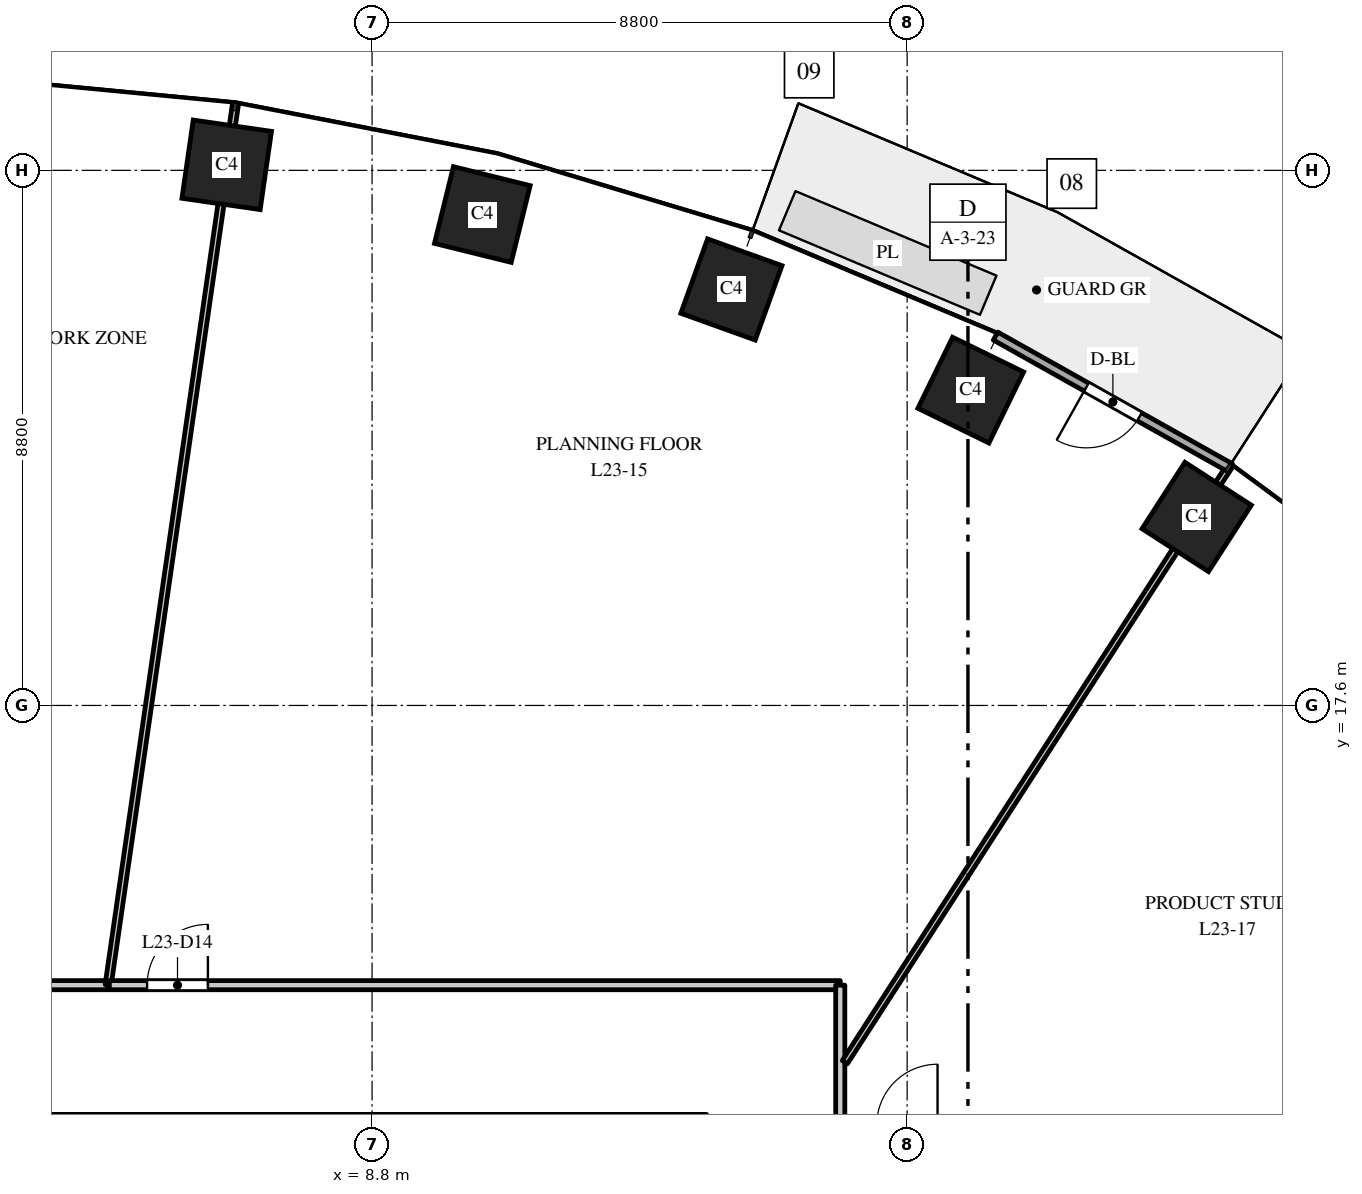
"""IFC4 building model, lengths in metres.
Left out: names, types, materials, properties, quantities, classifications, styles, units other than length and angle.
Written with IfcOpenShell. Run it as: python <this file> out.ifc"""

import sys

from ifc_helpers import new_model, si_unit, direction, frame, frame_2d, origin, origin_2d, place, context, subcontext, project, spatial, rectangle, extrude, element, fill, save


model = new_model("IFC4")
c1 = context("Model", 3, precision=1e-05, world=origin(), true_north=direction((0.0, 1.0)))
c2 = subcontext(c1, "Body", "Model", "MODEL_VIEW")
j1 = project(units=[si_unit("LENGTHUNIT", "METRE"), si_unit("PLANEANGLEUNIT", "RADIAN")], contexts=[c1])
p1 = place(None, origin())
s1 = spatial("IfcSite", under=j1, at=p1, CompositionType="ELEMENT")
p2 = place(p1, origin())
s2 = spatial("IfcBuilding", under=s1, at=p2, CompositionType="ELEMENT")
p3 = place(p2, frame((0.0, 0.0, 104.0)))
s3 = spatial("IfcBuildingStorey", under=s2, at=p3, CompositionType="ELEMENT", Elevation=104.0)
for number, where, z_axis, x_axis in (
    (1, (22.362, 20.7, 0.0), (0.0, 0.0, 1.0), (-0.84, 0.542, 0.0)),
    (2, (18.646, 22.785, 0.0), (0.0, 0.0, 1.0), (-0.898, 0.439, 0.0)),
    (3, (14.709, 24.441, 0.0), (0.0, 0.0, 1.0), (-0.941, 0.338, 0.0)),
    (4, (10.613, 25.674, 0.0), (0.0, 0.0, 1.0), (-0.971, 0.24, 0.0)),
    (5, (6.409, 26.491, 0.0), (0.0, 0.0, 1.0), (-0.99, 0.143, 0.0)),
):
    element("IfcColumn", number, at=place(p3, frame(where, z_axis=z_axis, x_axis=x_axis)), inside=s3, PredefinedType="COLUMN", context=c2, shape_type="SweptSolid", body=[
        extrude(rectangle(XDim=1.3, YDim=1.3, at=origin_2d()), origin(), (0.0, 0.0, 1.0), 4.0),
    ])
p4 = place(p3, frame((22.913, 21.509, 0.0), z_axis=(0.0, 0.0, 1.0), x_axis=(-0.872046572975, 0.489422899509, 0.0)))
e6 = element("IfcWall", 6, at=p4, inside=s3, PredefinedType="STANDARD", context=c2, shape_type="SweptSolid", body=[
    extrude(rectangle(XDim=4.426, YDim=0.15, at=frame_2d((2.213, 0.0))), origin(), (0.0, 0.0, 1.0), 3.7),
])
p5 = place(p4, frame((1.713, 0.0, 0.0)))
e7 = element("IfcOpeningElement", 7, at=p5, cuts=e6, PredefinedType="OPENING", context=c2, shape_type="SweptSolid", body=[
    extrude(rectangle(XDim=1.0, YDim=2.4, at=frame_2d((0.5, 1.2))), frame((0.0, 0.085, 0.0), z_axis=(0.0, -1.0, 0.0), x_axis=(1.0, 0.0, 0.0)), (0.0, 0.0, 1.0), 0.17),
])
p6 = place(p3, frame((-14.3, 10.8, 0.0), z_axis=(0.0, 0.0, 1.0), x_axis=(1.0, 0.0, 0.0)))
e8 = element("IfcWall", 8, at=p6, inside=s3, PredefinedType="PARTITIONING", context=c2, shape_type="SweptSolid", body=[
    extrude(rectangle(XDim=28.6, YDim=0.15, at=frame_2d((14.3, 0.0))), origin(), (0.0, 0.0, 1.0), 2.85),
])
p7 = place(p6, frame((4.94, 0.0, 0.0)))
e9 = element("IfcOpeningElement", 9, at=p7, cuts=e8, PredefinedType="OPENING", context=c2, shape_type="SweptSolid", body=[
    extrude(rectangle(XDim=1.0, YDim=2.1, at=frame_2d((0.5, 1.05))), frame((0.0, 0.085, 0.0), z_axis=(0.0, -1.0, 0.0), x_axis=(1.0, 0.0, 0.0)), (0.0, 0.0, 1.0), 0.17),
])
p8 = place(p6, frame((9.707, 0.0, 0.0)))
e10 = element("IfcOpeningElement", 10, at=p8, cuts=e8, PredefinedType="OPENING", context=c2, shape_type="SweptSolid", body=[
    extrude(rectangle(XDim=1.0, YDim=2.1, at=frame_2d((0.5, 1.05))), frame((0.0, 0.085, 0.0), z_axis=(0.0, -1.0, 0.0), x_axis=(1.0, 0.0, 0.0)), (0.0, 0.0, 1.0), 0.17),
])
p9 = place(p6, frame((14.473, 0.0, 0.0)))
e11 = element("IfcOpeningElement", 11, at=p9, cuts=e8, PredefinedType="OPENING", context=c2, shape_type="SweptSolid", body=[
    extrude(rectangle(XDim=1.0, YDim=2.1, at=frame_2d((0.5, 1.05))), frame((0.0, 0.085, 0.0), z_axis=(0.0, -1.0, 0.0), x_axis=(1.0, 0.0, 0.0)), (0.0, 0.0, 1.0), 0.17),
])
p10 = place(p3, frame((1.299, 13.0, 0.0), z_axis=(0.0, 0.0, 1.0), x_axis=(1.0, 0.0, 0.0)))
e12 = element("IfcWall", 12, at=p10, inside=s3, PredefinedType="PARTITIONING", context=c2, shape_type="SweptSolid", body=[
    extrude(rectangle(XDim=3.16, YDim=0.15, at=frame_2d((1.58, 0.0))), origin(), (0.0, 0.0, 1.0), 2.85),
])
p11 = place(p10, frame((0.53, 0.0, 0.0)))
e13 = element("IfcOpeningElement", 13, at=p11, cuts=e12, PredefinedType="OPENING", context=c2, shape_type="SweptSolid", body=[
    extrude(rectangle(XDim=1.0, YDim=2.1, at=frame_2d((0.5, 1.05))), frame((0.0, 0.085, 0.0), z_axis=(0.0, -1.0, 0.0), x_axis=(1.0, 0.0, 0.0)), (0.0, 0.0, 1.0), 0.17),
])
p12 = place(p3, frame((4.459, 13.004, 0.0), z_axis=(0.0, 0.0, 1.0), x_axis=(0.143087196312, 0.98971008596, 0.0)))
e14 = element("IfcWall", 14, at=p12, inside=s3, PredefinedType="PARTITIONING", context=c2, shape_type="SweptSolid", body=[
    extrude(rectangle(XDim=14.628, YDim=0.1, at=frame_2d((7.314, 0.0))), origin(), (0.0, 0.0, 1.0), 2.85),
])
p13 = place(p3, frame((4.479, 13.0, 0.0), z_axis=(0.0, 0.0, 1.0), x_axis=(1.0, 0.0, 0.0)))
e15 = element("IfcWall", 15, at=p13, inside=s3, PredefinedType="PARTITIONING", context=c2, shape_type="SweptSolid", body=[
    extrude(rectangle(XDim=12.021, YDim=0.15, at=frame_2d((6.01, 0.0))), origin(), (0.0, 0.0, 1.0), 2.85),
])
p14 = place(p13, frame((0.621, 0.0, 0.0)))
e16 = element("IfcOpeningElement", 16, at=p14, cuts=e15, PredefinedType="OPENING", context=c2, shape_type="SweptSolid", body=[
    extrude(rectangle(XDim=1.0, YDim=2.1, at=frame_2d((0.5, 1.05))), frame((0.0, 0.085, 0.0), z_axis=(0.0, -1.0, 0.0), x_axis=(1.0, 0.0, 0.0)), (0.0, 0.0, 1.0), 0.17),
])
p15 = place(p3, frame((16.5, 10.7, 0.0), z_axis=(0.0, 0.0, 1.0), x_axis=(0.0, 1.0, 0.0)))
e17 = element("IfcWall", 17, at=p15, inside=s3, PredefinedType="PARTITIONING", context=c2, shape_type="SweptSolid", body=[
    extrude(rectangle(XDim=2.3, YDim=0.15, at=frame_2d((1.15, 0.0))), origin(), (0.0, 0.0, 1.0), 3.7),
])
p16 = place(p3, frame((16.575, 11.733, 0.0), z_axis=(0.0, 0.0, 1.0), x_axis=(0.54222594427, 0.840232720953, 0.0)))
e18 = element("IfcWall", 18, at=p16, inside=s3, PredefinedType="PARTITIONING", context=c2, shape_type="SweptSolid", body=[
    extrude(rectangle(XDim=11.674, YDim=0.1, at=frame_2d((5.837, 0.0))), origin(), (0.0, 0.0, 1.0), 3.7),
])
p17 = place(p5, origin())
e19 = element("IfcDoor", 19, at=p17, inside=s3, OperationType="SINGLE_SWING_RIGHT", PredefinedType="DOOR", context=c2, shape_type="SweptSolid", body=[
    extrude(rectangle(XDim=1.0, YDim=2.4, at=frame_2d((0.5, 1.2))), frame((0.0, 0.025, 0.0), z_axis=(0.0, -1.0, 0.0), x_axis=(1.0, 0.0, 0.0)), (0.0, 0.0, 1.0), 0.05),
])
fill(e7, e19)
p18 = place(p14, origin())
e20 = element("IfcDoor", 20, at=p18, inside=s3, OperationType="SINGLE_SWING_RIGHT", PredefinedType="DOOR", context=c2, shape_type="SweptSolid", body=[
    extrude(rectangle(XDim=1.0, YDim=2.1, at=frame_2d((0.5, 1.05))), frame((0.0, 0.025, 0.0), z_axis=(0.0, -1.0, 0.0), x_axis=(1.0, 0.0, 0.0)), (0.0, 0.0, 1.0), 0.05),
])
fill(e16, e20)
save(model, sys.argv[1])
